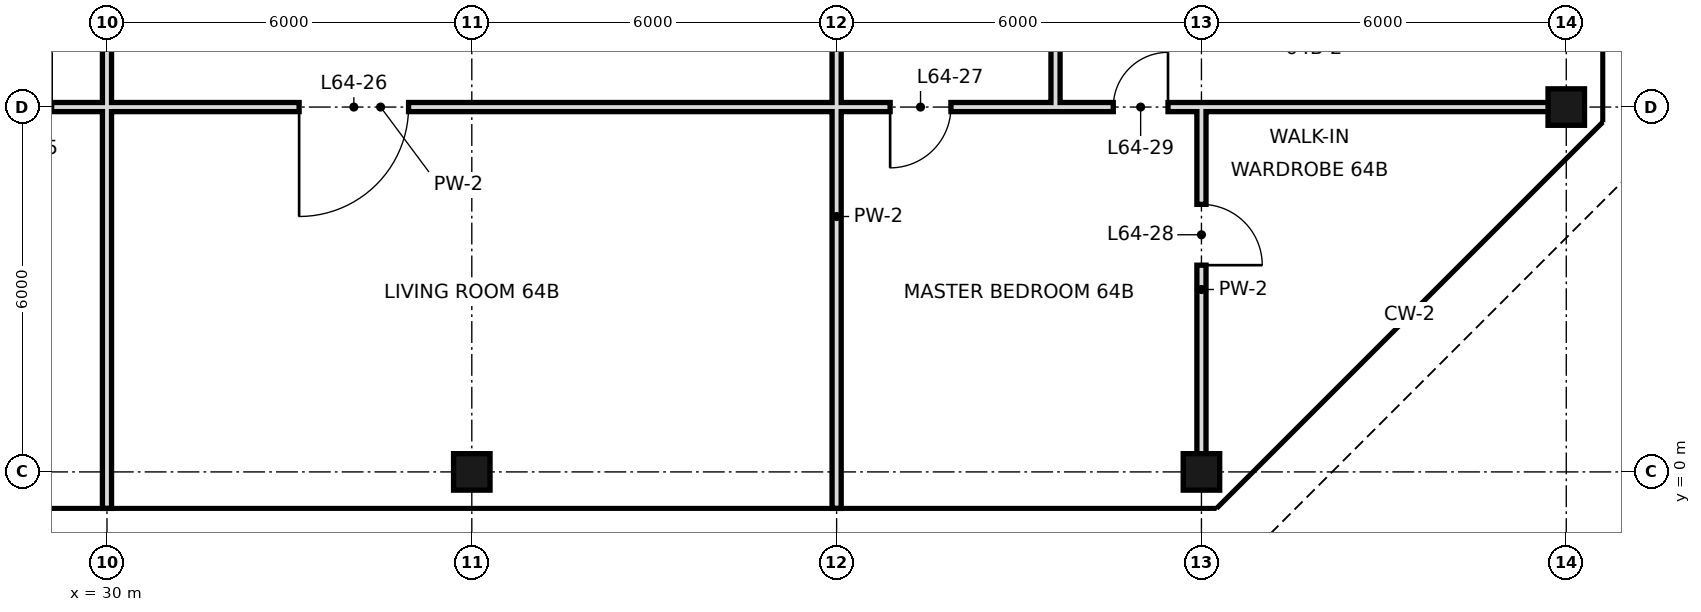
"""IFC4 building model, lengths in metres.
Left out: names, types, materials, properties, quantities, classifications, styles, units other than length and angle.
Written with IfcOpenShell. Run it as: python <this file> out.ifc"""

import sys

from ifc_helpers import new_model, si_unit, direction, frame, frame_2d, origin, origin_2d, place, context, subcontext, project, spatial, rectangle, hollow_rectangle, extrude, element, fill, save


model = new_model("IFC4")
c1 = context("Model", 3, precision=1e-05, world=origin(), true_north=direction((0.0, 1.0)))
c2 = subcontext(c1, "Body", "Model", "MODEL_VIEW")
j1 = project(units=[si_unit("LENGTHUNIT", "METRE"), si_unit("PLANEANGLEUNIT", "RADIAN")], contexts=[c1])
p1 = place(None, origin())
s1 = spatial("IfcSite", under=j1, at=p1, CompositionType="ELEMENT")
p2 = place(p1, origin())
s2 = spatial("IfcBuilding", under=s1, at=p2, CompositionType="ELEMENT")
p3 = place(p2, frame((0.0, 0.0, 270.2)))
s3 = spatial("IfcBuildingStorey", under=s2, at=p3, CompositionType="ELEMENT", Elevation=270.2)
for number, where, z_axis, x_axis in (
    (1, (36.0, 0.0, 0.0), (0.0, 0.0, 1.0), (1.0, 0.0, 0.0)),
    (2, (48.0, 0.0, 0.0), (0.0, 0.0, 1.0), (1.0, 0.0, 0.0)),
    (3, (54.0, 6.0, 0.0), (0.0, 0.0, 1.0), (1.0, 0.0, 0.0)),
):
    element("IfcColumn", number, at=place(p3, frame(where, z_axis=z_axis, x_axis=x_axis)), inside=s3, PredefinedType="COLUMN", context=c2, shape_type="SweptSolid", body=[
        extrude(hollow_rectangle(XDim=0.6, YDim=0.6, WallThickness=0.028, at=origin_2d()), origin(), (0.0, 0.0, 1.0), 3.6),
    ])
p4 = place(p3, frame((30.0, -0.6, 0.0), z_axis=(0.0, 0.0, 1.0), x_axis=(0.0, 1.0, 0.0)))
e4 = element("IfcWall", 4, at=p4, inside=s3, PredefinedType="PARTITIONING", context=c2, shape_type="SweptSolid", body=[
    extrude(rectangle(XDim=6.6, YDim=0.15, at=frame_2d((3.3, 0.0))), origin(), (0.0, 0.0, 1.0), 2.72),
])
p5 = place(p3, frame((30.0, 6.0, 0.0), z_axis=(0.0, 0.0, 1.0), x_axis=(0.0, 1.0, 0.0)))
e5 = element("IfcWall", 5, at=p5, inside=s3, PredefinedType="PARTITIONING", context=c2, shape_type="SweptSolid", body=[
    extrude(rectangle(XDim=3.0, YDim=0.15, at=frame_2d((1.5, 0.0))), origin(), (0.0, 0.0, 1.0), 2.72),
])
p6 = place(p3, frame((42.0, -0.6, 0.0), z_axis=(0.0, 0.0, 1.0), x_axis=(0.0, 1.0, 0.0)))
e6 = element("IfcWall", 6, at=p6, inside=s3, PredefinedType="PARTITIONING", context=c2, shape_type="SweptSolid", body=[
    extrude(rectangle(XDim=9.6, YDim=0.15, at=frame_2d((4.8, 0.0))), origin(), (0.0, 0.0, 1.0), 2.72),
])
p7 = place(p3, frame((45.6, 6.0, 0.0), z_axis=(0.0, 0.0, 1.0), x_axis=(0.0, 1.0, 0.0)))
e7 = element("IfcWall", 7, at=p7, inside=s3, PredefinedType="PARTITIONING", context=c2, shape_type="SweptSolid", body=[
    extrude(rectangle(XDim=3.0, YDim=0.15, at=frame_2d((1.5, 0.0))), origin(), (0.0, 0.0, 1.0), 3.42),
])
p8 = place(p3, frame((48.0, 0.0, 0.0), z_axis=(0.0, 0.0, 1.0), x_axis=(0.0, 1.0, 0.0)))
e8 = element("IfcWall", 8, at=p8, inside=s3, PredefinedType="PARTITIONING", context=c2, shape_type="SweptSolid", body=[
    extrude(rectangle(XDim=6.0, YDim=0.15, at=frame_2d((3.0, 0.0))), origin(), (0.0, 0.0, 1.0), 2.72),
])
p9 = place(p8, frame((3.4, 0.0, 0.0)))
e9 = element("IfcOpeningElement", 9, at=p9, cuts=e8, PredefinedType="OPENING", context=c2, shape_type="SweptSolid", body=[
    extrude(rectangle(XDim=1.0, YDim=2.4, at=frame_2d((0.5, 1.2))), frame((0.0, 0.085, 0.0), z_axis=(0.0, -1.0, 0.0), x_axis=(1.0, 0.0, 0.0)), (0.0, 0.0, 1.0), 0.17),
])
p10 = place(p3, frame((30.0, 6.0, 0.0), z_axis=(0.0, 0.0, 1.0), x_axis=(1.0, 0.0, 0.0)))
e10 = element("IfcWall", 10, at=p10, inside=s3, PredefinedType="PARTITIONING", context=c2, shape_type="SweptSolid", body=[
    extrude(rectangle(XDim=15.6, YDim=0.15, at=frame_2d((7.8, 0.0))), origin(), (0.0, 0.0, 1.0), 2.97),
])
p11 = place(p10, frame((3.16, 0.0, 0.0)))
e11 = element("IfcOpeningElement", 11, at=p11, cuts=e10, PredefinedType="OPENING", context=c2, shape_type="SweptSolid", body=[
    extrude(rectangle(XDim=1.8, YDim=2.4, at=frame_2d((0.9, 1.2))), frame((0.0, 0.085, 0.0), z_axis=(0.0, -1.0, 0.0), x_axis=(1.0, 0.0, 0.0)), (0.0, 0.0, 1.0), 0.17),
])
p12 = place(p10, frame((12.88, 0.0, 0.0)))
e12 = element("IfcOpeningElement", 12, at=p12, cuts=e10, PredefinedType="OPENING", context=c2, shape_type="SweptSolid", body=[
    extrude(rectangle(XDim=1.0, YDim=2.4, at=frame_2d((0.5, 1.2))), frame((0.0, 0.085, 0.0), z_axis=(0.0, -1.0, 0.0), x_axis=(1.0, 0.0, 0.0)), (0.0, 0.0, 1.0), 0.17),
])
p13 = place(p3, frame((26.4, 6.0, 0.0), z_axis=(0.0, 0.0, 1.0), x_axis=(1.0, 0.0, 0.0)))
e13 = element("IfcWall", 13, at=p13, inside=s3, PredefinedType="PARTITIONING", context=c2, shape_type="SweptSolid", body=[
    extrude(rectangle(XDim=3.6, YDim=0.15, at=frame_2d((1.8, 0.0))), origin(), (0.0, 0.0, 1.0), 2.97),
])
p14 = place(p13, frame((1.79, 0.0, 0.0)))
e14 = element("IfcOpeningElement", 14, at=p14, cuts=e13, PredefinedType="OPENING", context=c2, shape_type="SweptSolid", body=[
    extrude(rectangle(XDim=0.9, YDim=2.4, at=frame_2d((0.45, 1.2))), frame((0.0, 0.085, 0.0), z_axis=(0.0, -1.0, 0.0), x_axis=(1.0, 0.0, 0.0)), (0.0, 0.0, 1.0), 0.17),
])
p15 = place(p3, frame((45.6, 6.0, 0.0), z_axis=(0.0, 0.0, 1.0), x_axis=(1.0, 0.0, 0.0)))
e15 = element("IfcWall", 15, at=p15, inside=s3, PredefinedType="PARTITIONING", context=c2, shape_type="SweptSolid", body=[
    extrude(rectangle(XDim=8.4, YDim=0.15, at=frame_2d((4.2, 0.0))), origin(), (0.0, 0.0, 1.0), 2.97),
])
p16 = place(p15, frame((0.95, 0.0, 0.0)))
e16 = element("IfcOpeningElement", 16, at=p16, cuts=e15, PredefinedType="OPENING", context=c2, shape_type="SweptSolid", body=[
    extrude(rectangle(XDim=0.9, YDim=2.4, at=frame_2d((0.45, 1.2))), frame((0.0, 0.085, 0.0), z_axis=(0.0, -1.0, 0.0), x_axis=(1.0, 0.0, 0.0)), (0.0, 0.0, 1.0), 0.17),
])
p17 = place(p11, frame((1.8, 0.0, 0.0), z_axis=(0.0, 0.0, 1.0), x_axis=(-1.0, 0.0, 0.0)))
e17 = element("IfcDoor", 17, at=p17, inside=s3, OperationType="SINGLE_SWING_RIGHT", PredefinedType="DOOR", context=c2, shape_type="SweptSolid", body=[
    extrude(rectangle(XDim=1.8, YDim=2.4, at=frame_2d((0.9, 1.2))), frame((0.0, 0.025, 0.0), z_axis=(0.0, -1.0, 0.0), x_axis=(1.0, 0.0, 0.0)), (0.0, 0.0, 1.0), 0.05),
])
fill(e11, e17)
p18 = place(p12, frame((1.0, 0.0, 0.0), z_axis=(0.0, 0.0, 1.0), x_axis=(-1.0, 0.0, 0.0)))
e18 = element("IfcDoor", 18, at=p18, inside=s3, OperationType="SINGLE_SWING_RIGHT", PredefinedType="DOOR", context=c2, shape_type="SweptSolid", body=[
    extrude(rectangle(XDim=1.0, YDim=2.4, at=frame_2d((0.5, 1.2))), frame((0.0, 0.025, 0.0), z_axis=(0.0, -1.0, 0.0), x_axis=(1.0, 0.0, 0.0)), (0.0, 0.0, 1.0), 0.05),
])
fill(e12, e18)
p19 = place(p9, frame((1.0, 0.0, 0.0), z_axis=(0.0, 0.0, 1.0), x_axis=(-1.0, 0.0, 0.0)))
e19 = element("IfcDoor", 19, at=p19, inside=s3, OperationType="SINGLE_SWING_RIGHT", PredefinedType="DOOR", context=c2, shape_type="SweptSolid", body=[
    extrude(rectangle(XDim=1.0, YDim=2.4, at=frame_2d((0.5, 1.2))), frame((0.0, 0.025, 0.0), z_axis=(0.0, -1.0, 0.0), x_axis=(1.0, 0.0, 0.0)), (0.0, 0.0, 1.0), 0.05),
])
fill(e9, e19)
p20 = place(p16, frame((0.9, 0.0, 0.0), z_axis=(0.0, 0.0, 1.0), x_axis=(-1.0, 0.0, 0.0)))
e20 = element("IfcDoor", 20, at=p20, inside=s3, OperationType="SINGLE_SWING_LEFT", PredefinedType="DOOR", context=c2, shape_type="SweptSolid", body=[
    extrude(rectangle(XDim=0.9, YDim=2.4, at=frame_2d((0.45, 1.2))), frame((0.0, 0.025, 0.0), z_axis=(0.0, -1.0, 0.0), x_axis=(1.0, 0.0, 0.0)), (0.0, 0.0, 1.0), 0.05),
])
fill(e16, e20)
save(model, sys.argv[1])
